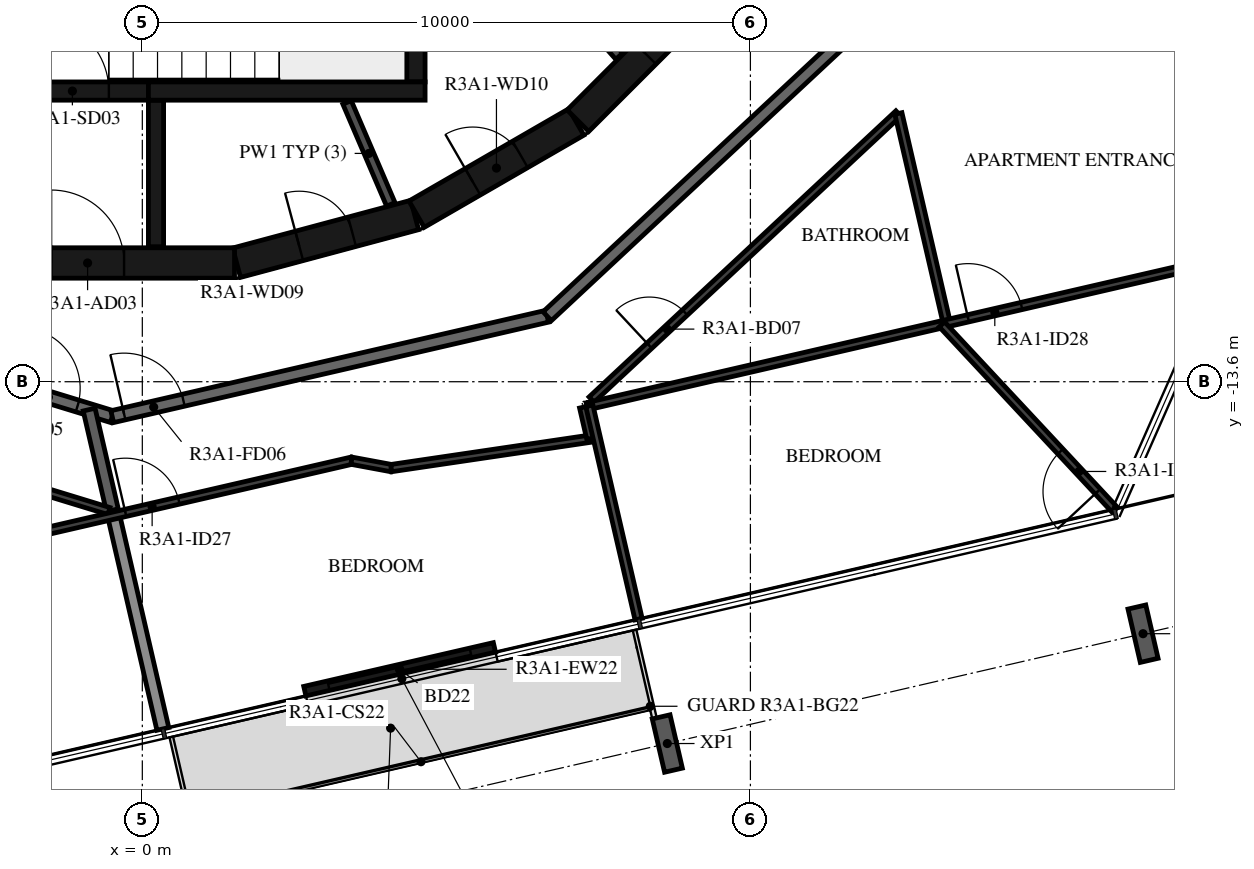
"""IFC4 building model, lengths in metres.
Left out: names, types, materials, properties, quantities, classifications, styles, units other than length and angle.
Written with IfcOpenShell. Run it as: python <this file> out.ifc"""

import sys

from ifc_helpers import new_model, si_unit, direction, frame, frame_2d, origin, origin_2d, place, context, subcontext, project, spatial, rectangle, i_section, extrude, element, fill, save


model = new_model("IFC4")
c1 = context("Model", 3, precision=1e-05, world=origin(), true_north=direction((0.0, 1.0)))
c2 = subcontext(c1, "Body", "Model", "MODEL_VIEW")
j1 = project(units=[si_unit("LENGTHUNIT", "METRE"), si_unit("PLANEANGLEUNIT", "RADIAN")], contexts=[c1])
p1 = place(None, origin())
s1 = spatial("IfcSite", under=j1, at=p1, CompositionType="ELEMENT")
p2 = place(p1, origin())
s2 = spatial("IfcBuilding", under=s1, at=p2, CompositionType="ELEMENT")
p3 = place(p2, frame((0.0, 0.0, 116.9)))
s3 = spatial("IfcBuildingStorey", under=s2, at=p3, CompositionType="ELEMENT", Elevation=116.9)
for number, where, z_axis, x_axis in (
    (1, (8.634, -19.55, -0.38), (0.0, 0.0, 1.0), (-0.974, -0.225, 0.0)),
    (2, (16.457, -17.744, -0.38), (0.0, 0.0, 1.0), (-0.974, -0.225, 0.0)),
):
    element("IfcColumn", number, at=place(p3, frame(where, z_axis=z_axis, x_axis=x_axis)), inside=s3, PredefinedType="COLUMN", context=c2, shape_type="SweptSolid", body=[
        extrude(i_section(OverallWidth=0.3, OverallDepth=0.9, WebThickness=0.019, FlangeThickness=0.035, FilletRadius=0.03, at=origin_2d()), origin(), (0.0, 0.0, 1.0), 3.5),
    ])
p4 = place(p3, frame((2.673, -18.689, 0.0), z_axis=(0.0, 0.0, 1.0), x_axis=(0.974360325718, 0.224993234715, 0.0)))
e3 = element("IfcWall", 3, at=p4, inside=s3, PredefinedType="STANDARD", context=c2, shape_type="SweptSolid", body=[
    extrude(rectangle(XDim=3.2, YDim=0.16, at=frame_2d((1.6, 0.0))), origin(), (0.0, 0.0, 1.0), 3.12),
])
p5 = place(p4, frame((0.4, 0.0, 0.0)))
e4 = element("IfcOpeningElement", 4, at=p5, cuts=e3, PredefinedType="OPENING", context=c2, shape_type="SweptSolid", body=[
    extrude(rectangle(XDim=2.4, YDim=2.4, at=frame_2d((1.2, 1.2))), frame((0.0, 0.09, 0.0), z_axis=(0.0, -1.0, 0.0), x_axis=(1.0, 0.0, 0.0)), (0.0, 0.0, 1.0), 0.18),
])
p6 = place(p3, frame((1.55, -11.643, 0.0), z_axis=(0.0, 0.0, 1.0), x_axis=(0.965948410781, 0.258734743916, 0.0)))
e5 = element("IfcWall", 5, at=p6, inside=s3, PredefinedType="SHEAR", context=c2, shape_type="SweptSolid", body=[
    extrude(rectangle(XDim=3.033, YDim=0.5, at=frame_2d((1.516, 0.0))), origin(), (0.0, 0.0, 1.0), 3.12),
])
p7 = place(p6, frame((1.066, 0.0, 0.0)))
e6 = element("IfcOpeningElement", 6, at=p7, cuts=e5, PredefinedType="OPENING", context=c2, shape_type="SweptSolid", body=[
    extrude(rectangle(XDim=0.9, YDim=2.1, at=frame_2d((0.45, 1.05))), frame((0.0, 0.26, 0.0), z_axis=(0.0, -1.0, 0.0), x_axis=(1.0, 0.0, 0.0)), (0.0, 0.0, 1.0), 0.52),
])
p8 = place(p3, frame((4.51, -10.845, 0.0), z_axis=(0.0, 0.0, 1.0), x_axis=(0.865975092491, 0.500087131594, 0.0)))
e7 = element("IfcWall", 7, at=p8, inside=s3, PredefinedType="SHEAR", context=c2, shape_type="SweptSolid", body=[
    extrude(rectangle(XDim=3.033, YDim=0.5, at=frame_2d((1.516, 0.0))), origin(), (0.0, 0.0, 1.0), 3.12),
])
p9 = place(p8, frame((1.066, 0.0, 0.0)))
e8 = element("IfcOpeningElement", 8, at=p9, cuts=e7, PredefinedType="OPENING", context=c2, shape_type="SweptSolid", body=[
    extrude(rectangle(XDim=0.9, YDim=2.1, at=frame_2d((0.45, 1.05))), frame((0.0, 0.26, 0.0), z_axis=(0.0, -1.0, 0.0), x_axis=(1.0, 0.0, 0.0)), (0.0, 0.0, 1.0), 0.52),
])
p10 = place(p3, frame((7.164, -9.308, 0.0), z_axis=(0.0, 0.0, 1.0), x_axis=(0.707106781187, 0.707106781187, 0.0)))
e9 = element("IfcWall", 9, at=p10, inside=s3, PredefinedType="SHEAR", context=c2, shape_type="SweptSolid", body=[
    extrude(rectangle(XDim=3.032, YDim=0.5, at=frame_2d((1.516, 0.0))), origin(), (0.0, 0.0, 1.0), 3.12),
])
p11 = place(p10, frame((1.566, 0.0, 0.0)))
e10 = element("IfcOpeningElement", 10, at=p11, cuts=e9, PredefinedType="OPENING", context=c2, shape_type="SweptSolid", body=[
    extrude(rectangle(XDim=0.9, YDim=2.1, at=frame_2d((0.45, 1.05))), frame((0.0, 0.26, 0.0), z_axis=(0.0, -1.0, 0.0), x_axis=(1.0, 0.0, 0.0)), (0.0, 0.0, 1.0), 0.52),
])
p12 = place(p3, frame((-1.516, -11.647, 0.0), z_axis=(0.0, 0.0, 1.0), x_axis=(1.0, 0.0, 0.0)))
e11 = element("IfcWall", 11, at=p12, inside=s3, PredefinedType="SHEAR", context=c2, shape_type="SweptSolid", body=[
    extrude(rectangle(XDim=3.033, YDim=0.5, at=frame_2d((1.516, 0.0))), origin(), (0.0, 0.0, 1.0), 3.12),
])
p13 = place(p12, frame((0.016, 0.0, 0.0)))
e12 = element("IfcOpeningElement", 12, at=p13, cuts=e11, PredefinedType="OPENING", context=c2, shape_type="SweptSolid", body=[
    extrude(rectangle(XDim=1.2, YDim=2.1, at=frame_2d((0.6, 1.05))), frame((0.0, 0.26, 0.0), z_axis=(0.0, -1.0, 0.0), x_axis=(1.0, 0.0, 0.0)), (0.0, 0.0, 1.0), 0.52),
])
p14 = place(p3, frame((4.5, -8.67, 0.0), z_axis=(0.0, 0.0, 1.0), x_axis=(0.0, 1.0, 0.0)))
e13 = element("IfcWall", 13, at=p14, inside=s3, PredefinedType="SHEAR", context=c2, shape_type="SweptSolid", body=[
    extrude(rectangle(XDim=3.32, YDim=0.3, at=frame_2d((1.66, 0.0))), origin(), (0.0, 0.0, 1.0), 3.12),
])
p15 = place(p3, frame((0.1, -8.82, 0.0), z_axis=(0.0, 0.0, 1.0), x_axis=(1.0, 0.0, 0.0)))
e14 = element("IfcWall", 14, at=p15, inside=s3, PredefinedType="SHEAR", context=c2, shape_type="SweptSolid", body=[
    extrude(rectangle(XDim=4.55, YDim=0.3, at=frame_2d((2.275, 0.0))), origin(), (0.0, 0.0, 1.0), 3.12),
])
p16 = place(p3, frame((-2.4, -8.82, 0.0), z_axis=(0.0, 0.0, 1.0), x_axis=(1.0, 0.0, 0.0)))
e15 = element("IfcWall", 15, at=p16, inside=s3, PredefinedType="SHEAR", context=c2, shape_type="SweptSolid", body=[
    extrude(rectangle(XDim=2.5, YDim=0.3, at=frame_2d((1.25, 0.0))), origin(), (0.0, 0.0, 1.0), 3.12),
])
p17 = place(p16, frame((0.65, 0.0, 0.0)))
e16 = element("IfcOpeningElement", 16, at=p17, cuts=e15, PredefinedType="OPENING", context=c2, shape_type="SweptSolid", body=[
    extrude(rectangle(XDim=1.2, YDim=2.1, at=frame_2d((0.6, 1.05))), frame((0.0, 0.16, 0.0), z_axis=(0.0, -1.0, 0.0), x_axis=(1.0, 0.0, 0.0)), (0.0, 0.0, 1.0), 0.32),
])
p18 = place(p3, frame((0.225, -8.97, 0.0), z_axis=(0.0, 0.0, 1.0), x_axis=(0.0, -1.0, 0.0)))
e17 = element("IfcWall", 17, at=p18, inside=s3, PredefinedType="SHEAR", context=c2, shape_type="SweptSolid", body=[
    extrude(rectangle(XDim=2.41, YDim=0.25, at=frame_2d((1.205, 0.0))), origin(), (0.0, 0.0, 1.0), 3.12),
])
p19 = place(p3, frame((7.842, -8.248, 0.0), z_axis=(0.0, 0.0, 1.0), x_axis=(-0.66446128181, 0.747322691329, 0.0)))
e18 = element("IfcWall", 18, at=p19, inside=s3, PredefinedType="PARTITIONING", context=c2, shape_type="SweptSolid", body=[
    extrude(rectangle(XDim=4.198, YDim=0.15, at=frame_2d((2.099, 0.0))), origin(), (0.0, 0.0, 1.0), 3.12),
])
p20 = place(p3, frame((3.367, -9.007, 0.0), z_axis=(0.0, 0.0, 1.0), x_axis=(0.394387482265, -0.918944238696, 0.0)))
e19 = element("IfcWall", 19, at=p20, inside=s3, PredefinedType="PARTITIONING", context=c2, shape_type="SweptSolid", body=[
    extrude(rectangle(XDim=1.825, YDim=0.15, at=frame_2d((0.913, 0.0))), origin(), (0.0, 0.0, 1.0), 3.12),
])
p21 = place(p3, frame((-7.516, -12.028, 0.0), z_axis=(0.0, 0.0, 1.0), x_axis=(0.956306642771, -0.292365533182, 0.0)))
e20 = element("IfcWall", 20, at=p21, inside=s3, PredefinedType="STANDARD", context=c2, shape_type="SweptSolid", body=[
    extrude(rectangle(XDim=7.342, YDim=0.2, at=frame_2d((3.671, 0.0))), origin(), (0.0, 0.0, 1.0), 3.12),
])
p22 = place(p21, frame((5.745, 0.0, 0.0)))
e21 = element("IfcOpeningElement", 21, at=p22, cuts=e20, PredefinedType="OPENING", context=c2, shape_type="SweptSolid", body=[
    extrude(rectangle(XDim=1.0, YDim=2.1, at=frame_2d((0.5, 1.05))), frame((0.0, 0.11, 0.0), z_axis=(0.0, -1.0, 0.0), x_axis=(1.0, 0.0, 0.0)), (0.0, 0.0, 1.0), 0.22),
])
p23 = place(p3, frame((-0.495, -14.175, 0.0), z_axis=(0.0, 0.0, 1.0), x_axis=(0.974376622151, 0.224922649383, 0.0)))
e22 = element("IfcWall", 22, at=p23, inside=s3, PredefinedType="STANDARD", context=c2, shape_type="SweptSolid", body=[
    extrude(rectangle(XDim=7.342, YDim=0.2, at=frame_2d((3.671, 0.0))), origin(), (0.0, 0.0, 1.0), 3.12),
])
p24 = place(p23, frame((0.2, 0.0, 0.0)))
e23 = element("IfcOpeningElement", 23, at=p24, cuts=e22, PredefinedType="OPENING", context=c2, shape_type="SweptSolid", body=[
    extrude(rectangle(XDim=1.0, YDim=2.1, at=frame_2d((0.5, 1.05))), frame((0.0, 0.11, 0.0), z_axis=(0.0, -1.0, 0.0), x_axis=(1.0, 0.0, 0.0)), (0.0, 0.0, 1.0), 0.22),
])
p25 = place(p3, frame((6.659, -12.523, 0.0), z_axis=(0.0, 0.0, 1.0), x_axis=(0.731350455479, 0.682001841105, 0.0)))
e24 = element("IfcWall", 24, at=p25, inside=s3, PredefinedType="STANDARD", context=c2, shape_type="SweptSolid", body=[
    extrude(rectangle(XDim=7.342, YDim=0.2, at=frame_2d((3.671, 0.0))), origin(), (0.0, 0.0, 1.0), 3.12),
])
p26 = place(p3, frame((-0.492, -15.713, 0.0), z_axis=(0.0, 0.0, 1.0), x_axis=(-0.224974992875, 0.97436453783, 0.0)))
e25 = element("IfcWall", 25, at=p26, inside=s3, PredefinedType="STANDARD", context=c2, shape_type="SweptSolid", body=[
    extrude(rectangle(XDim=1.698, YDim=0.2, at=frame_2d((0.849, 0.0))), origin(), (0.0, 0.0, 1.0), 3.12),
])
p27 = place(p3, frame((0.338, -19.31, 0.0), z_axis=(0.0, 0.0, 1.0), x_axis=(-0.224943703639, 0.9743717618, 0.0)))
e26 = element("IfcWall", 26, at=p27, inside=s3, PredefinedType="STANDARD", context=c2, shape_type="SweptSolid", body=[
    extrude(rectangle(XDim=3.6, YDim=0.2, at=frame_2d((1.8, 0.0))), origin(), (0.0, 0.0, 1.0), 2.73),
])
p28 = place(p3, frame((-8.339, -13.345, 0.0), z_axis=(0.0, 0.0, 1.0), x_axis=(0.956310145342, -0.292354076276, 0.0)))
e27 = element("IfcWall", 27, at=p28, inside=s3, PredefinedType="PARTITIONING", context=c2, shape_type="SweptSolid", body=[
    extrude(rectangle(XDim=8.146, YDim=0.12, at=frame_2d((4.073, 0.0))), origin(), (0.0, 0.0, 1.0), 3.12),
])
p29 = place(p28, frame((1.565, 0.0, 0.0)))
e28 = element("IfcOpeningElement", 28, at=p29, cuts=e27, PredefinedType="OPENING", context=c2, shape_type="SweptSolid", body=[
    extrude(rectangle(XDim=0.8, YDim=2.1, at=frame_2d((0.4, 1.05))), frame((0.0, 0.07, 0.0), z_axis=(0.0, -1.0, 0.0), x_axis=(1.0, 0.0, 0.0)), (0.0, 0.0, 1.0), 0.14),
])
p30 = place(p3, frame((-14.736, -19.095, 0.0), z_axis=(0.0, 0.0, 1.0), x_axis=(0.974369132722, 0.224955091516, 0.0)))
e29 = element("IfcWall", 29, at=p30, inside=s3, PredefinedType="PARTITIONING", context=c2, shape_type="SweptSolid", body=[
    extrude(rectangle(XDim=18.654, YDim=0.12, at=frame_2d((9.327, 0.0))), origin(), (0.0, 0.0, 1.0), 3.12),
])
p31 = place(p30, frame((3.383, 0.0, 0.0)))
e30 = element("IfcOpeningElement", 30, at=p31, cuts=e29, PredefinedType="OPENING", context=c2, shape_type="SweptSolid", body=[
    extrude(rectangle(XDim=0.9, YDim=2.1, at=frame_2d((0.45, 1.05))), frame((0.0, 0.07, 0.0), z_axis=(0.0, -1.0, 0.0), x_axis=(1.0, 0.0, 0.0)), (0.0, 0.0, 1.0), 0.14),
])
p32 = place(p30, frame((6.81, 0.0, 0.0)))
e31 = element("IfcOpeningElement", 31, at=p32, cuts=e29, PredefinedType="OPENING", context=c2, shape_type="SweptSolid", body=[
    extrude(rectangle(XDim=0.9, YDim=2.1, at=frame_2d((0.45, 1.05))), frame((0.0, 0.07, 0.0), z_axis=(0.0, -1.0, 0.0), x_axis=(1.0, 0.0, 0.0)), (0.0, 0.0, 1.0), 0.14),
])
p33 = place(p30, frame((0.2, 0.0, 0.0)))
e32 = element("IfcOpeningElement", 32, at=p33, cuts=e29, PredefinedType="OPENING", context=c2, shape_type="SweptSolid", body=[
    extrude(rectangle(XDim=0.9, YDim=2.1, at=frame_2d((0.45, 1.05))), frame((0.0, 0.07, 0.0), z_axis=(0.0, -1.0, 0.0), x_axis=(1.0, 0.0, 0.0)), (0.0, 0.0, 1.0), 0.14),
])
p34 = place(p30, frame((14.839, 0.0, 0.0)))
e33 = element("IfcOpeningElement", 33, at=p34, cuts=e29, PredefinedType="OPENING", context=c2, shape_type="SweptSolid", body=[
    extrude(rectangle(XDim=0.9, YDim=2.1, at=frame_2d((0.45, 1.05))), frame((0.0, 0.07, 0.0), z_axis=(0.0, -1.0, 0.0), x_axis=(1.0, 0.0, 0.0)), (0.0, 0.0, 1.0), 0.14),
])
p35 = place(p3, frame((3.44, -14.899, 0.0), z_axis=(0.0, 0.0, 1.0), x_axis=(0.98314539863, -0.182825395264, 0.0)))
e34 = element("IfcWall", 34, at=p35, inside=s3, PredefinedType="PARTITIONING", context=c2, shape_type="SweptSolid", body=[
    extrude(rectangle(XDim=0.665, YDim=0.12, at=frame_2d((0.333, 0.0))), origin(), (0.0, 0.0, 1.0), 3.12),
])
p36 = place(p3, frame((4.094, -15.021, 0.0), z_axis=(0.0, 0.0, 1.0), x_axis=(0.989259616433, 0.146169118814, 0.0)))
e35 = element("IfcWall", 35, at=p36, inside=s3, PredefinedType="PARTITIONING", context=c2, shape_type="SweptSolid", body=[
    extrude(rectangle(XDim=3.311, YDim=0.12, at=frame_2d((1.655, 0.0))), origin(), (0.0, 0.0, 1.0), 3.12),
])
p37 = place(p3, frame((7.368, -14.537, 0.0), z_axis=(0.0, 0.0, 1.0), x_axis=(-0.224960301109, 0.974367929955, 0.0)))
e36 = element("IfcWall", 36, at=p37, inside=s3, PredefinedType="PARTITIONING", context=c2, shape_type="SweptSolid", body=[
    extrude(rectangle(XDim=0.531, YDim=0.12, at=frame_2d((0.265, 0.0))), origin(), (0.0, 0.0, 1.0), 3.12),
])
p38 = place(p3, frame((7.388, -13.894, 0.0), z_axis=(0.0, 0.0, 1.0), x_axis=(0.731339966659, 0.682013088707, 0.0)))
e37 = element("IfcWall", 37, at=p38, inside=s3, PredefinedType="PARTITIONING", context=c2, shape_type="SweptSolid", body=[
    extrude(rectangle(XDim=6.899, YDim=0.12, at=frame_2d((3.45, 0.0))), origin(), (0.0, 0.0, 1.0), 3.12),
])
p39 = place(p38, frame((1.3, 0.0, 0.0)))
e38 = element("IfcOpeningElement", 38, at=p39, cuts=e37, PredefinedType="OPENING", context=c2, shape_type="SweptSolid", body=[
    extrude(rectangle(XDim=0.8, YDim=2.1, at=frame_2d((0.4, 1.05))), frame((0.0, 0.07, 0.0), z_axis=(0.0, -1.0, 0.0), x_axis=(1.0, 0.0, 0.0)), (0.0, 0.0, 1.0), 0.14),
])
p40 = place(p3, frame((12.434, -9.189, 0.0), z_axis=(0.0, 0.0, 1.0), x_axis=(0.224924972887, -0.974376085796, 0.0)))
e39 = element("IfcWall", 39, at=p40, inside=s3, PredefinedType="PARTITIONING", context=c2, shape_type="SweptSolid", body=[
    extrude(rectangle(XDim=3.541, YDim=0.12, at=frame_2d((1.771, 0.0))), origin(), (0.0, 0.0, 1.0), 3.12),
])
p41 = place(p3, frame((7.312, -14.005, 0.0), z_axis=(0.0, 0.0, 1.0), x_axis=(0.974367924791, 0.224960323474, 0.0)))
e40 = element("IfcWall", 40, at=p41, inside=s3, PredefinedType="PARTITIONING", context=c2, shape_type="SweptSolid", body=[
    extrude(rectangle(XDim=14.679, YDim=0.12, at=frame_2d((7.34, 0.0))), origin(), (0.0, 0.0, 1.0), 3.12),
])
p42 = place(p41, frame((6.433, 0.0, 0.0)))
e41 = element("IfcOpeningElement", 41, at=p42, cuts=e40, PredefinedType="OPENING", context=c2, shape_type="SweptSolid", body=[
    extrude(rectangle(XDim=0.9, YDim=2.1, at=frame_2d((0.45, 1.05))), frame((0.0, 0.07, 0.0), z_axis=(0.0, -1.0, 0.0), x_axis=(1.0, 0.0, 0.0)), (0.0, 0.0, 1.0), 0.14),
])
p43 = place(p41, frame((12.812, 0.0, 0.0)))
e42 = element("IfcOpeningElement", 42, at=p43, cuts=e40, PredefinedType="OPENING", context=c2, shape_type="SweptSolid", body=[
    extrude(rectangle(XDim=0.9, YDim=2.1, at=frame_2d((0.45, 1.05))), frame((0.0, 0.07, 0.0), z_axis=(0.0, -1.0, 0.0), x_axis=(1.0, 0.0, 0.0)), (0.0, 0.0, 1.0), 0.14),
])
p44 = place(p3, frame((8.161, -17.504, 0.0), z_axis=(0.0, 0.0, 1.0), x_axis=(-0.224943703639, 0.9743717618, 0.0)))
e43 = element("IfcWall", 43, at=p44, inside=s3, PredefinedType="PARTITIONING", context=c2, shape_type="SweptSolid", body=[
    extrude(rectangle(XDim=3.6, YDim=0.12, at=frame_2d((1.8, 0.0))), origin(), (0.0, 0.0, 1.0), 2.73),
])
p45 = place(p3, frame((15.985, -15.698, 0.0), z_axis=(0.0, 0.0, 1.0), x_axis=(-0.681979185924, 0.731371581322, 0.0)))
e44 = element("IfcWall", 44, at=p45, inside=s3, PredefinedType="PARTITIONING", context=c2, shape_type="SweptSolid", body=[
    extrude(rectangle(XDim=4.157, YDim=0.12, at=frame_2d((2.079, 0.0))), origin(), (0.0, 0.0, 1.0), 3.12),
])
p46 = place(p45, frame((0.4, 0.0, 0.0)))
e45 = element("IfcOpeningElement", 45, at=p46, cuts=e44, PredefinedType="OPENING", context=c2, shape_type="SweptSolid", body=[
    extrude(rectangle(XDim=0.9, YDim=2.1, at=frame_2d((0.45, 1.05))), frame((0.0, 0.07, 0.0), z_axis=(0.0, -1.0, 0.0), x_axis=(1.0, 0.0, 0.0)), (0.0, 0.0, 1.0), 0.14),
])
p47 = place(p5, origin())
e46 = element("IfcDoor", 46, at=p47, inside=s3, OperationType="DOUBLE_DOOR_SLIDING", PredefinedType="DOOR", context=c2, shape_type="SweptSolid", body=[
    extrude(rectangle(XDim=2.4, YDim=2.4, at=frame_2d((1.2, 1.2))), frame((0.0, 0.025, 0.0), z_axis=(0.0, -1.0, 0.0), x_axis=(1.0, 0.0, 0.0)), (0.0, 0.0, 1.0), 0.05),
])
fill(e4, e46)
p48 = place(p17, origin())
e47 = element("IfcDoor", 47, at=p48, inside=s3, OperationType="SINGLE_SWING_LEFT", PredefinedType="DOOR", context=c2, shape_type="SweptSolid", body=[
    extrude(rectangle(XDim=1.2, YDim=2.1, at=frame_2d((0.6, 1.05))), frame((0.0, 0.025, 0.0), z_axis=(0.0, -1.0, 0.0), x_axis=(1.0, 0.0, 0.0)), (0.0, 0.0, 1.0), 0.05),
])
fill(e16, e47)
p49 = place(p13, origin())
e48 = element("IfcDoor", 48, at=p49, inside=s3, OperationType="SINGLE_SWING_RIGHT", PredefinedType="DOOR", context=c2, shape_type="SweptSolid", body=[
    extrude(rectangle(XDim=1.2, YDim=2.1, at=frame_2d((0.6, 1.05))), frame((0.0, 0.025, 0.0), z_axis=(0.0, -1.0, 0.0), x_axis=(1.0, 0.0, 0.0)), (0.0, 0.0, 1.0), 0.05),
])
fill(e12, e48)
p50 = place(p11, origin())
e49 = element("IfcDoor", 49, at=p50, inside=s3, OperationType="SINGLE_SWING_LEFT", PredefinedType="DOOR", context=c2, shape_type="SweptSolid", body=[
    extrude(rectangle(XDim=0.9, YDim=2.1, at=frame_2d((0.45, 1.05))), frame((0.0, 0.025, 0.0), z_axis=(0.0, -1.0, 0.0), x_axis=(1.0, 0.0, 0.0)), (0.0, 0.0, 1.0), 0.05),
])
fill(e10, e49)
p51 = place(p7, origin())
e50 = element("IfcDoor", 50, at=p51, inside=s3, OperationType="SINGLE_SWING_RIGHT", PredefinedType="DOOR", context=c2, shape_type="SweptSolid", body=[
    extrude(rectangle(XDim=0.9, YDim=2.1, at=frame_2d((0.45, 1.05))), frame((0.0, 0.025, 0.0), z_axis=(0.0, -1.0, 0.0), x_axis=(1.0, 0.0, 0.0)), (0.0, 0.0, 1.0), 0.05),
])
fill(e6, e50)
p52 = place(p9, origin())
e51 = element("IfcDoor", 51, at=p52, inside=s3, OperationType="SINGLE_SWING_LEFT", PredefinedType="DOOR", context=c2, shape_type="SweptSolid", body=[
    extrude(rectangle(XDim=0.9, YDim=2.1, at=frame_2d((0.45, 1.05))), frame((0.0, 0.025, 0.0), z_axis=(0.0, -1.0, 0.0), x_axis=(1.0, 0.0, 0.0)), (0.0, 0.0, 1.0), 0.05),
])
fill(e8, e51)
p53 = place(p22, origin())
e52 = element("IfcDoor", 52, at=p53, inside=s3, OperationType="SINGLE_SWING_LEFT", PredefinedType="DOOR", context=c2, shape_type="SweptSolid", body=[
    extrude(rectangle(XDim=1.0, YDim=2.1, at=frame_2d((0.5, 1.05))), frame((0.0, 0.025, 0.0), z_axis=(0.0, -1.0, 0.0), x_axis=(1.0, 0.0, 0.0)), (0.0, 0.0, 1.0), 0.05),
])
fill(e21, e52)
p54 = place(p24, origin())
e53 = element("IfcDoor", 53, at=p54, inside=s3, OperationType="SINGLE_SWING_LEFT", PredefinedType="DOOR", context=c2, shape_type="SweptSolid", body=[
    extrude(rectangle(XDim=1.0, YDim=2.1, at=frame_2d((0.5, 1.05))), frame((0.0, 0.025, 0.0), z_axis=(0.0, -1.0, 0.0), x_axis=(1.0, 0.0, 0.0)), (0.0, 0.0, 1.0), 0.05),
])
fill(e23, e53)
p55 = place(p34, origin())
e54 = element("IfcDoor", 54, at=p55, inside=s3, OperationType="SINGLE_SWING_LEFT", PredefinedType="DOOR", context=c2, shape_type="SweptSolid", body=[
    extrude(rectangle(XDim=0.9, YDim=2.1, at=frame_2d((0.45, 1.05))), frame((0.0, 0.025, 0.0), z_axis=(0.0, -1.0, 0.0), x_axis=(1.0, 0.0, 0.0)), (0.0, 0.0, 1.0), 0.05),
])
fill(e33, e54)
p56 = place(p39, origin())
e55 = element("IfcDoor", 55, at=p56, inside=s3, OperationType="SINGLE_SWING_RIGHT", PredefinedType="DOOR", context=c2, shape_type="SweptSolid", body=[
    extrude(rectangle(XDim=0.8, YDim=2.1, at=frame_2d((0.4, 1.05))), frame((0.0, 0.025, 0.0), z_axis=(0.0, -1.0, 0.0), x_axis=(1.0, 0.0, 0.0)), (0.0, 0.0, 1.0), 0.05),
])
fill(e38, e55)
p57 = place(p42, origin())
e56 = element("IfcDoor", 56, at=p57, inside=s3, OperationType="SINGLE_SWING_RIGHT", PredefinedType="DOOR", context=c2, shape_type="SweptSolid", body=[
    extrude(rectangle(XDim=0.9, YDim=2.1, at=frame_2d((0.45, 1.05))), frame((0.0, 0.025, 0.0), z_axis=(0.0, -1.0, 0.0), x_axis=(1.0, 0.0, 0.0)), (0.0, 0.0, 1.0), 0.05),
])
fill(e41, e56)
p58 = place(p46, origin())
e57 = element("IfcDoor", 57, at=p58, inside=s3, OperationType="SINGLE_SWING_LEFT", PredefinedType="DOOR", context=c2, shape_type="SweptSolid", body=[
    extrude(rectangle(XDim=0.9, YDim=2.1, at=frame_2d((0.45, 1.05))), frame((0.0, 0.025, 0.0), z_axis=(0.0, -1.0, 0.0), x_axis=(1.0, 0.0, 0.0)), (0.0, 0.0, 1.0), 0.05),
])
fill(e45, e57)
save(model, sys.argv[1])
